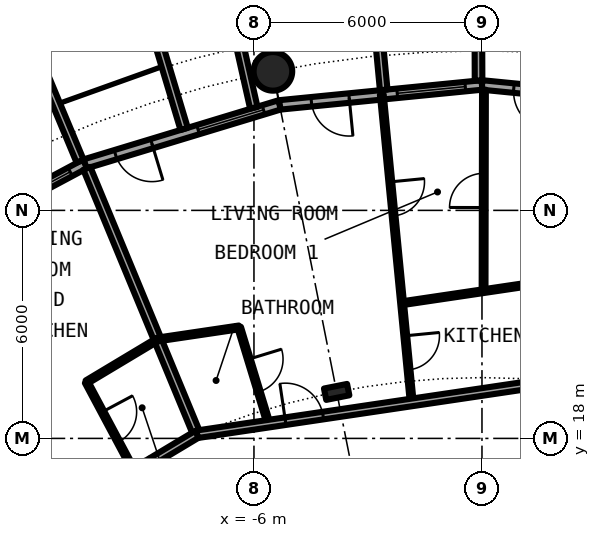
"""IFC4 building model, lengths in metres.
Left out: names, types, materials, properties, quantities, classifications, styles, units other than length and angle.
Written with IfcOpenShell. Run it as: python <this file> out.ifc"""

import sys

from ifc_helpers import new_model, si_unit, direction, frame, frame_2d, origin, origin_2d, place, context, subcontext, project, spatial, rectangle, hollow_circle, i_section, extrude, element, fill, save


model = new_model("IFC4")
c1 = context("Model", 3, precision=1e-05, world=origin(), true_north=direction((0.0, 1.0)))
c2 = subcontext(c1, "Body", "Model", "MODEL_VIEW")
j1 = project(units=[si_unit("LENGTHUNIT", "METRE"), si_unit("PLANEANGLEUNIT", "RADIAN")], contexts=[c1])
p1 = place(None, origin())
s1 = spatial("IfcSite", under=j1, at=p1, CompositionType="ELEMENT")
p2 = place(p1, origin())
s2 = spatial("IfcBuilding", under=s1, at=p2, CompositionType="ELEMENT")
p3 = place(p2, frame((0.0, 0.0, 28.9)))
s3 = spatial("IfcBuildingStorey", under=s2, at=p3, CompositionType="ELEMENT", Elevation=28.9)
p4 = place(p3, frame((-5.501, 27.658, 0.0), z_axis=(0.0, 0.0, 1.0), x_axis=(1.0, 0.0, 0.0)))
e1 = element("IfcColumn", 1, at=p4, inside=s3, PredefinedType="COLUMN", context=c2, shape_type="SweptSolid", body=[
    extrude(hollow_circle(Radius=0.508, WallThickness=0.05, at=origin_2d()), origin(), (0.0, 0.0, 1.0), 3.05),
])
p5 = place(p3, frame((-3.824, 19.223, 0.0), z_axis=(0.0, 0.0, 1.0), x_axis=(-0.195090322016, 0.980785280403, 0.0)))
e2 = element("IfcColumn", 2, at=p5, inside=s3, PredefinedType="COLUMN", context=c2, shape_type="SweptSolid", body=[
    extrude(i_section(OverallWidth=0.305, OverallDepth=0.62, WebThickness=0.021, FlangeThickness=0.04, FilletRadius=0.027, at=origin_2d()), origin(), (0.0, 0.0, 1.0), 3.05),
])
p6 = place(p3, frame((5.326, 26.775, 0.0), z_axis=(0.0, 0.0, 1.0), x_axis=(-0.995173996315, 0.098126026407, 0.0)))
e3 = element("IfcWall", 3, at=p6, inside=s3, PredefinedType="SOLIDWALL", context=c2, shape_type="SweptSolid", body=[
    extrude(rectangle(XDim=5.352, YDim=0.25, at=frame_2d((2.676, 0.0))), origin(), (0.0, 0.0, 1.0), 2.7),
])
p7 = place(p6, frame((0.441, 0.0, 0.3)))
e4 = element("IfcOpeningElement", 4, at=p7, cuts=e3, PredefinedType="OPENING", context=c2, shape_type="SweptSolid", body=[
    extrude(rectangle(XDim=1.8, YDim=2.1, at=frame_2d((0.9, 1.05))), frame((0.0, 0.135, 0.0), z_axis=(0.0, -1.0, 0.0), x_axis=(1.0, 0.0, 0.0)), (0.0, 0.0, 1.0), 0.27),
])
p8 = place(p6, frame((3.51, 0.0, 0.0)))
e5 = element("IfcOpeningElement", 5, at=p8, cuts=e3, PredefinedType="OPENING", context=c2, shape_type="SweptSolid", body=[
    extrude(rectangle(XDim=1.0, YDim=2.2, at=frame_2d((0.5, 1.1))), frame((0.0, 0.135, 0.0), z_axis=(0.0, -1.0, 0.0), x_axis=(1.0, 0.0, 0.0)), (0.0, 0.0, 1.0), 0.27),
])
p9 = place(p3, frame((0.0, 27.3, 0.0), z_axis=(0.0, 0.0, 1.0), x_axis=(-0.995173996315, -0.098126026407, 0.0)))
e6 = element("IfcWall", 6, at=p9, inside=s3, PredefinedType="SOLIDWALL", context=c2, shape_type="SweptSolid", body=[
    extrude(rectangle(XDim=5.352, YDim=0.25, at=frame_2d((2.676, 0.0))), origin(), (0.0, 0.0, 1.0), 2.7),
])
p10 = place(p9, frame((0.441, 0.0, 0.3)))
e7 = element("IfcOpeningElement", 7, at=p10, cuts=e6, PredefinedType="OPENING", context=c2, shape_type="SweptSolid", body=[
    extrude(rectangle(XDim=1.8, YDim=2.1, at=frame_2d((0.9, 1.05))), frame((0.0, 0.135, 0.0), z_axis=(0.0, -1.0, 0.0), x_axis=(1.0, 0.0, 0.0)), (0.0, 0.0, 1.0), 0.27),
])
p11 = place(p9, frame((3.51, 0.0, 0.0)))
e8 = element("IfcOpeningElement", 8, at=p11, cuts=e6, PredefinedType="OPENING", context=c2, shape_type="SweptSolid", body=[
    extrude(rectangle(XDim=1.0, YDim=2.2, at=frame_2d((0.5, 1.1))), frame((0.0, 0.135, 0.0), z_axis=(0.0, -1.0, 0.0), x_axis=(1.0, 0.0, 0.0)), (0.0, 0.0, 1.0), 0.27),
])
p12 = place(p3, frame((-0.09, 27.417, -0.03), z_axis=(0.0, 0.0, 1.0), x_axis=(-0.00347308367, 0.999993968827, 0.0)))
e9 = element("IfcWall", 9, at=p12, inside=s3, PredefinedType="SOLIDWALL", context=c2, shape_type="SweptSolid", body=[
    extrude(rectangle(XDim=2.882, YDim=0.2, at=frame_2d((1.441, 0.0))), origin(), (0.0, 0.0, 1.0), 2.73),
])
p13 = place(p3, frame((-2.586, 27.171, -0.03), z_axis=(0.0, 0.0, 1.0), x_axis=(-0.094548432284, 0.995520262954, 0.0)))
e10 = element("IfcWall", 10, at=p13, inside=s3, PredefinedType="SOLIDWALL", context=c2, shape_type="SweptSolid", body=[
    extrude(rectangle(XDim=3.006, YDim=0.2, at=frame_2d((1.503, 0.0))), origin(), (0.0, 0.0, 1.0), 2.73),
])
p14 = place(p3, frame((-5.326, 26.775, 0.0), z_axis=(0.0, 0.0, 1.0), x_axis=(-0.956965678721, -0.290201119486, 0.0)))
e11 = element("IfcWall", 11, at=p14, inside=s3, PredefinedType="SOLIDWALL", context=c2, shape_type="SweptSolid", body=[
    extrude(rectangle(XDim=5.351, YDim=0.25, at=frame_2d((2.676, 0.0))), origin(), (0.0, 0.0, 1.0), 2.7),
])
p15 = place(p14, frame((0.441, 0.0, 0.3)))
e12 = element("IfcOpeningElement", 12, at=p15, cuts=e11, PredefinedType="OPENING", context=c2, shape_type="SweptSolid", body=[
    extrude(rectangle(XDim=1.8, YDim=2.1, at=frame_2d((0.9, 1.05))), frame((0.0, 0.135, 0.0), z_axis=(0.0, -1.0, 0.0), x_axis=(1.0, 0.0, 0.0)), (0.0, 0.0, 1.0), 0.27),
])
p16 = place(p14, frame((3.51, 0.0, 0.0)))
e13 = element("IfcOpeningElement", 13, at=p16, cuts=e11, PredefinedType="OPENING", context=c2, shape_type="SweptSolid", body=[
    extrude(rectangle(XDim=1.0, YDim=2.2, at=frame_2d((0.5, 1.1))), frame((0.0, 0.135, 0.0), z_axis=(0.0, -1.0, 0.0), x_axis=(1.0, 0.0, 0.0)), (0.0, 0.0, 1.0), 0.27),
])
p17 = place(p3, frame((-6.004, 26.7, -0.03), z_axis=(0.0, 0.0, 1.0), x_axis=(-0.219609259383, 0.975587911566, 0.0)))
e14 = element("IfcWall", 14, at=p17, inside=s3, PredefinedType="SOLIDWALL", context=c2, shape_type="SweptSolid", body=[
    extrude(rectangle(XDim=2.933, YDim=0.2, at=frame_2d((1.466, 0.0))), origin(), (0.0, 0.0, 1.0), 2.73),
])
p18 = place(p3, frame((-7.837, 26.144, -0.03), z_axis=(0.0, 0.0, 1.0), x_axis=(-0.287064767992, 0.957911174889, 0.0)))
e15 = element("IfcWall", 15, at=p18, inside=s3, PredefinedType="SOLIDWALL", context=c2, shape_type="SweptSolid", body=[
    extrude(rectangle(XDim=3.006, YDim=0.2, at=frame_2d((1.503, 0.0))), origin(), (0.0, 0.0, 1.0), 2.73),
])
p19 = place(p3, frame((-10.447, 25.222, 0.0), z_axis=(0.0, 0.0, 1.0), x_axis=(-0.881915646801, -0.471407246368, 0.0)))
e16 = element("IfcWall", 16, at=p19, inside=s3, PredefinedType="SOLIDWALL", context=c2, shape_type="SweptSolid", body=[
    extrude(rectangle(XDim=5.352, YDim=0.25, at=frame_2d((2.676, 0.0))), origin(), (0.0, 0.0, 1.0), 2.7),
])
p20 = place(p19, frame((0.441, 0.0, 0.3)))
e17 = element("IfcOpeningElement", 17, at=p20, cuts=e16, PredefinedType="OPENING", context=c2, shape_type="SweptSolid", body=[
    extrude(rectangle(XDim=1.8, YDim=2.1, at=frame_2d((0.9, 1.05))), frame((0.0, 0.135, 0.0), z_axis=(0.0, -1.0, 0.0), x_axis=(1.0, 0.0, 0.0)), (0.0, 0.0, 1.0), 0.27),
])
p21 = place(p19, frame((3.51, 0.0, 0.0)))
e18 = element("IfcOpeningElement", 18, at=p21, cuts=e16, PredefinedType="OPENING", context=c2, shape_type="SweptSolid", body=[
    extrude(rectangle(XDim=1.0, YDim=2.2, at=frame_2d((0.5, 1.1))), frame((0.0, 0.135, 0.0), z_axis=(0.0, -1.0, 0.0), x_axis=(1.0, 0.0, 0.0)), (0.0, 0.0, 1.0), 0.27),
])
p22 = place(p3, frame((-10.575, 25.295, -0.03), z_axis=(0.0, 0.0, 1.0), x_axis=(-0.385697364644, 0.922625353492, 0.0)))
e19 = element("IfcWall", 19, at=p22, inside=s3, PredefinedType="SOLIDWALL", context=c2, shape_type="SweptSolid", body=[
    extrude(rectangle(XDim=2.883, YDim=0.2, at=frame_2d((1.442, 0.0))), origin(), (0.0, 0.0, 1.0), 2.73),
])
p23 = place(p3, frame((-10.405, 19.481, 0.0), z_axis=(0.0, 0.0, 1.0), x_axis=(0.471151994359, -0.882052038267, 0.0)))
e20 = element("IfcWall", 20, at=p23, inside=s3, PredefinedType="PARTITIONING", context=c2, shape_type="SweptSolid", body=[
    extrude(rectangle(XDim=2.674, YDim=0.1, at=frame_2d((1.337, 0.0))), origin(), (0.0, 0.0, 1.0), 2.7),
])
p24 = place(p23, frame((0.887, 0.0, 0.0)))
e21 = element("IfcOpeningElement", 21, at=p24, cuts=e20, PredefinedType="OPENING", context=c2, shape_type="SweptSolid", body=[
    extrude(rectangle(XDim=0.9, YDim=2.3, at=frame_2d((0.45, 1.15))), frame((0.0, 0.06, 0.0), z_axis=(0.0, -1.0, 0.0), x_axis=(1.0, 0.0, 0.0)), (0.0, 0.0, 1.0), 0.12),
])
p25 = place(p3, frame((-10.398, 25.106, 0.0), z_axis=(0.0, 0.0, 1.0), x_axis=(0.382490346157, -0.923959487801, 0.0)))
e22 = element("IfcWall", 22, at=p25, inside=s3, PredefinedType="PARTITIONING", context=c2, shape_type="SweptSolid", body=[
    extrude(rectangle(XDim=7.574, YDim=0.2, at=frame_2d((3.787, 0.0))), origin(), (0.0, 0.0, 1.0), 2.7),
])
p26 = place(p3, frame((-6.39, 20.921, 0.0), z_axis=(0.0, 0.0, 1.0), x_axis=(0.292206826201, -0.956355148845, 0.0)))
e23 = element("IfcWall", 23, at=p26, inside=s3, PredefinedType="PARTITIONING", context=c2, shape_type="SweptSolid", body=[
    extrude(rectangle(XDim=2.648, YDim=0.1, at=frame_2d((1.324, 0.0))), origin(), (0.0, 0.0, 1.0), 2.7),
])
p27 = place(p26, frame((0.874, 0.0, 0.0)))
e24 = element("IfcOpeningElement", 24, at=p27, cuts=e23, PredefinedType="OPENING", context=c2, shape_type="SweptSolid", body=[
    extrude(rectangle(XDim=0.9, YDim=2.3, at=frame_2d((0.45, 1.15))), frame((0.0, 0.06, 0.0), z_axis=(0.0, -1.0, 0.0), x_axis=(1.0, 0.0, 0.0)), (0.0, 0.0, 1.0), 0.12),
])
p28 = place(p3, frame((-2.636, 27.047, 0.0), z_axis=(0.0, 0.0, 1.0), x_axis=(0.096836141099, -0.995300337475, 0.0)))
e25 = element("IfcWall", 25, at=p28, inside=s3, PredefinedType="PARTITIONING", context=c2, shape_type="SweptSolid", body=[
    extrude(rectangle(XDim=8.138, YDim=0.1, at=frame_2d((4.069, 0.0))), origin(), (0.0, 0.0, 1.0), 2.7),
])
p29 = place(p28, frame((6.377, 0.0, 0.0)))
e26 = element("IfcOpeningElement", 26, at=p29, cuts=e25, PredefinedType="OPENING", context=c2, shape_type="SweptSolid", body=[
    extrude(rectangle(XDim=0.9, YDim=2.3, at=frame_2d((0.45, 1.15))), frame((0.0, 0.06, 0.0), z_axis=(0.0, -1.0, 0.0), x_axis=(1.0, 0.0, 0.0)), (0.0, 0.0, 1.0), 0.12),
])
p30 = place(p28, frame((2.308, 0.0, 0.0)))
e27 = element("IfcOpeningElement", 27, at=p30, cuts=e25, PredefinedType="OPENING", context=c2, shape_type="SweptSolid", body=[
    extrude(rectangle(XDim=0.9, YDim=2.3, at=frame_2d((0.45, 1.15))), frame((0.0, 0.06, 0.0), z_axis=(0.0, -1.0, 0.0), x_axis=(1.0, 0.0, 0.0)), (0.0, 0.0, 1.0), 0.12),
])
p31 = place(p3, frame((0.042, 21.875, 0.0), z_axis=(0.0, 0.0, 1.0), x_axis=(0.001888614256, 0.999998216567, 0.0)))
e28 = element("IfcWall", 28, at=p31, inside=s3, PredefinedType="PARTITIONING", context=c2, shape_type="SweptSolid", body=[
    extrude(rectangle(XDim=5.3, YDim=0.1, at=frame_2d((2.65, 0.0))), origin(), (0.0, 0.0, 1.0), 2.7),
])
p32 = place(p31, frame((2.2, 0.0, 0.0)))
e29 = element("IfcOpeningElement", 29, at=p32, cuts=e28, PredefinedType="OPENING", context=c2, shape_type="SweptSolid", body=[
    extrude(rectangle(XDim=0.9, YDim=2.3, at=frame_2d((0.45, 1.15))), frame((0.0, 0.06, 0.0), z_axis=(0.0, -1.0, 0.0), x_axis=(1.0, 0.0, 0.0)), (0.0, 0.0, 1.0), 0.12),
])
p33 = place(p3, frame((-7.501, 18.108, 0.0), z_axis=(0.0, 0.0, 1.0), x_axis=(0.989167514259, 0.146791105777, 0.0)))
e30 = element("IfcWall", 30, at=p33, inside=s3, PredefinedType="PARTITIONING", context=c2, shape_type="SweptSolid", body=[
    extrude(rectangle(XDim=9.525, YDim=0.2, at=frame_2d((4.763, 0.0))), origin(), (0.0, 0.0, 1.0), 2.38),
])
p34 = place(p33, frame((2.355, 0.0, 0.0)))
e31 = element("IfcOpeningElement", 31, at=p34, cuts=e30, PredefinedType="OPENING", context=c2, shape_type="SweptSolid", body=[
    extrude(rectangle(XDim=1.0, YDim=2.3, at=frame_2d((0.5, 1.15))), frame((0.0, 0.11, 0.0), z_axis=(0.0, -1.0, 0.0), x_axis=(1.0, 0.0, 0.0)), (0.0, 0.0, 1.0), 0.22),
])
p35 = place(p3, frame((-10.653, 16.218, 0.0), z_axis=(0.0, 0.0, 1.0), x_axis=(0.857656999296, 0.514222200569, 0.0)))
e32 = element("IfcWall", 32, at=p35, inside=s3, PredefinedType="PARTITIONING", context=c2, shape_type="SweptSolid", body=[
    extrude(rectangle(XDim=3.675, YDim=0.2, at=frame_2d((1.838, 0.0))), origin(), (0.0, 0.0, 1.0), 2.38),
])
p36 = place(p3, frame((-8.534, 20.603, 0.0), z_axis=(0.0, 0.0, 1.0), x_axis=(0.989187732684, 0.14665479708, 0.0)))
e33 = element("IfcWall", 33, at=p36, inside=s3, PredefinedType="PARTITIONING", context=c2, shape_type="SweptSolid", body=[
    extrude(rectangle(XDim=2.167, YDim=0.1, at=frame_2d((1.084, 0.0))), origin(), (0.0, 0.0, 1.0), 2.7),
])
p37 = place(p3, frame((-2.102, 21.557, 0.0), z_axis=(0.0, 0.0, 1.0), x_axis=(0.989171386505, 0.146765009863, 0.0)))
e34 = element("IfcWall", 34, at=p37, inside=s3, PredefinedType="PARTITIONING", context=c2, shape_type="SweptSolid", body=[
    extrude(rectangle(XDim=4.335, YDim=0.1, at=frame_2d((2.167, 0.0))), origin(), (0.0, 0.0, 1.0), 2.7),
])
p38 = place(p3, frame((-10.405, 19.481, 0.0), z_axis=(0.0, 0.0, 1.0), x_axis=(0.857611386679, 0.514298268943, 0.0)))
e35 = element("IfcWall", 35, at=p38, inside=s3, PredefinedType="PARTITIONING", context=c2, shape_type="SweptSolid", body=[
    extrude(rectangle(XDim=2.182, YDim=0.1, at=frame_2d((1.091, 0.0))), origin(), (0.0, 0.0, 1.0), 2.7),
])
p39 = place(p8, origin())
e36 = element("IfcDoor", 36, at=p39, inside=s3, OperationType="SINGLE_SWING_LEFT", PredefinedType="DOOR", context=c2, shape_type="SweptSolid", body=[
    extrude(rectangle(XDim=1.0, YDim=2.2, at=frame_2d((0.5, 1.1))), frame((0.0, 0.025, 0.0), z_axis=(0.0, -1.0, 0.0), x_axis=(1.0, 0.0, 0.0)), (0.0, 0.0, 1.0), 0.05),
])
fill(e5, e36)
p40 = place(p10, origin())
e37 = element("IfcWindow", 37, at=p40, inside=s3, PartitioningType="SINGLE_PANEL", PredefinedType="WINDOW", context=c2, shape_type="SweptSolid", body=[
    extrude(rectangle(XDim=1.8, YDim=2.1, at=frame_2d((0.9, 1.05))), frame((0.0, 0.03, 0.0), z_axis=(0.0, -1.0, 0.0), x_axis=(1.0, 0.0, 0.0)), (0.0, 0.0, 1.0), 0.06),
])
fill(e7, e37)
p41 = place(p11, origin())
e38 = element("IfcDoor", 38, at=p41, inside=s3, OperationType="SINGLE_SWING_LEFT", PredefinedType="DOOR", context=c2, shape_type="SweptSolid", body=[
    extrude(rectangle(XDim=1.0, YDim=2.2, at=frame_2d((0.5, 1.1))), frame((0.0, 0.025, 0.0), z_axis=(0.0, -1.0, 0.0), x_axis=(1.0, 0.0, 0.0)), (0.0, 0.0, 1.0), 0.05),
])
fill(e8, e38)
p42 = place(p15, origin())
e39 = element("IfcWindow", 39, at=p42, inside=s3, PartitioningType="SINGLE_PANEL", PredefinedType="WINDOW", context=c2, shape_type="SweptSolid", body=[
    extrude(rectangle(XDim=1.8, YDim=2.1, at=frame_2d((0.9, 1.05))), frame((0.0, 0.03, 0.0), z_axis=(0.0, -1.0, 0.0), x_axis=(1.0, 0.0, 0.0)), (0.0, 0.0, 1.0), 0.06),
])
fill(e12, e39)
p43 = place(p16, origin())
e40 = element("IfcDoor", 40, at=p43, inside=s3, OperationType="SINGLE_SWING_LEFT", PredefinedType="DOOR", context=c2, shape_type="SweptSolid", body=[
    extrude(rectangle(XDim=1.0, YDim=2.2, at=frame_2d((0.5, 1.1))), frame((0.0, 0.025, 0.0), z_axis=(0.0, -1.0, 0.0), x_axis=(1.0, 0.0, 0.0)), (0.0, 0.0, 1.0), 0.05),
])
fill(e13, e40)
p44 = place(p20, origin())
e41 = element("IfcWindow", 41, at=p44, inside=s3, PartitioningType="SINGLE_PANEL", PredefinedType="WINDOW", context=c2, shape_type="SweptSolid", body=[
    extrude(rectangle(XDim=1.8, YDim=2.1, at=frame_2d((0.9, 1.05))), frame((0.0, 0.03, 0.0), z_axis=(0.0, -1.0, 0.0), x_axis=(1.0, 0.0, 0.0)), (0.0, 0.0, 1.0), 0.06),
])
fill(e17, e41)
p45 = place(p34, origin())
e42 = element("IfcDoor", 42, at=p45, inside=s3, OperationType="SINGLE_SWING_LEFT", PredefinedType="DOOR", context=c2, shape_type="SweptSolid", body=[
    extrude(rectangle(XDim=1.0, YDim=2.3, at=frame_2d((0.5, 1.15))), frame((0.0, 0.025, 0.0), z_axis=(0.0, -1.0, 0.0), x_axis=(1.0, 0.0, 0.0)), (0.0, 0.0, 1.0), 0.05),
])
fill(e31, e42)
p46 = place(p27, origin())
e43 = element("IfcDoor", 43, at=p46, inside=s3, OperationType="SINGLE_SWING_LEFT", PredefinedType="DOOR", context=c2, shape_type="SweptSolid", body=[
    extrude(rectangle(XDim=0.9, YDim=2.3, at=frame_2d((0.45, 1.15))), frame((0.0, 0.025, 0.0), z_axis=(0.0, -1.0, 0.0), x_axis=(1.0, 0.0, 0.0)), (0.0, 0.0, 1.0), 0.05),
])
fill(e24, e43)
p47 = place(p29, origin())
e44 = element("IfcDoor", 44, at=p47, inside=s3, OperationType="SINGLE_SWING_RIGHT", PredefinedType="DOOR", context=c2, shape_type="SweptSolid", body=[
    extrude(rectangle(XDim=0.9, YDim=2.3, at=frame_2d((0.45, 1.15))), frame((0.0, 0.025, 0.0), z_axis=(0.0, -1.0, 0.0), x_axis=(1.0, 0.0, 0.0)), (0.0, 0.0, 1.0), 0.05),
])
fill(e26, e44)
p48 = place(p30, origin())
e45 = element("IfcDoor", 45, at=p48, inside=s3, OperationType="SINGLE_SWING_LEFT", PredefinedType="DOOR", context=c2, shape_type="SweptSolid", body=[
    extrude(rectangle(XDim=0.9, YDim=2.3, at=frame_2d((0.45, 1.15))), frame((0.0, 0.025, 0.0), z_axis=(0.0, -1.0, 0.0), x_axis=(1.0, 0.0, 0.0)), (0.0, 0.0, 1.0), 0.05),
])
fill(e27, e45)
p49 = place(p32, origin())
e46 = element("IfcDoor", 46, at=p49, inside=s3, OperationType="SINGLE_SWING_RIGHT", PredefinedType="DOOR", context=c2, shape_type="SweptSolid", body=[
    extrude(rectangle(XDim=0.9, YDim=2.3, at=frame_2d((0.45, 1.15))), frame((0.0, 0.025, 0.0), z_axis=(0.0, -1.0, 0.0), x_axis=(1.0, 0.0, 0.0)), (0.0, 0.0, 1.0), 0.05),
])
fill(e29, e46)
p50 = place(p24, origin())
e47 = element("IfcDoor", 47, at=p50, inside=s3, OperationType="SINGLE_SWING_LEFT", PredefinedType="DOOR", context=c2, shape_type="SweptSolid", body=[
    extrude(rectangle(XDim=0.9, YDim=2.3, at=frame_2d((0.45, 1.15))), frame((0.0, 0.025, 0.0), z_axis=(0.0, -1.0, 0.0), x_axis=(1.0, 0.0, 0.0)), (0.0, 0.0, 1.0), 0.05),
])
fill(e21, e47)
save(model, sys.argv[1])
